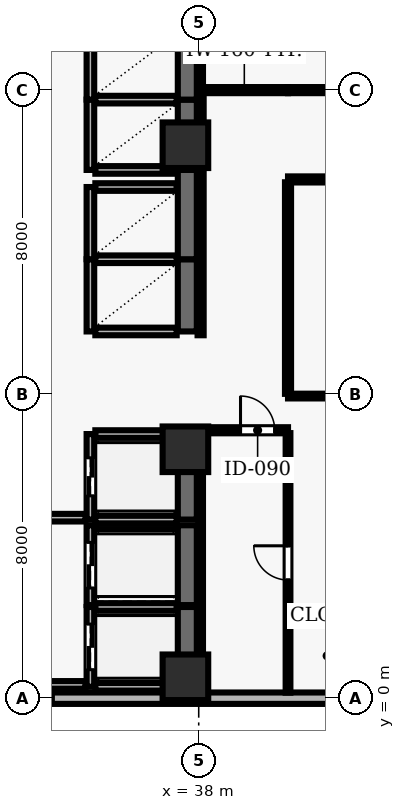
"""IFC4 building model, lengths in metres.
Left out: names, types, materials, properties, quantities, classifications, styles, units other than length and angle.
Written with IfcOpenShell. Run it as: python <this file> out.ifc"""

import sys

from ifc_helpers import new_model, si_unit, direction, frame, frame_2d, origin, origin_2d, place, context, subcontext, project, spatial, rectangle, extrude, element, fill, save


model = new_model("IFC4")
c1 = context("Model", 3, precision=1e-05, world=origin(), true_north=direction((0.0, 1.0)))
c2 = subcontext(c1, "Body", "Model", "MODEL_VIEW")
j1 = project(units=[si_unit("LENGTHUNIT", "METRE"), si_unit("PLANEANGLEUNIT", "RADIAN")], contexts=[c1])
p1 = place(None, origin())
s1 = spatial("IfcSite", under=j1, at=p1, CompositionType="ELEMENT")
p2 = place(p1, origin())
s2 = spatial("IfcBuilding", under=s1, at=p2, CompositionType="ELEMENT")
p3 = place(p2, frame((0.0, 0.0, 150.2)))
s3 = spatial("IfcBuildingStorey", under=s2, at=p3, CompositionType="ELEMENT", Elevation=150.2)
for number, where, z_axis, x_axis in (
    (1, (37.65, 0.55, 0.0), (0.0, 0.0, 1.0), (1.0, 0.0, 0.0)),
    (2, (37.65, 6.55, 0.0), (0.0, 0.0, 1.0), (1.0, 0.0, 0.0)),
    (3, (37.65, 14.55, 0.0), (0.0, 0.0, 1.0), (1.0, 0.0, 0.0)),
):
    element("IfcColumn", number, at=place(p3, frame(where, z_axis=z_axis, x_axis=x_axis)), inside=s3, PredefinedType="COLUMN", context=c2, shape_type="SweptSolid", body=[
        extrude(rectangle(XDim=1.2, YDim=1.2, at=origin_2d()), origin(), (0.0, 0.0, 1.0), 3.9),
    ])
p4 = place(p3, frame((24.5, 0.0, 0.0), z_axis=(0.0, 0.0, 1.0), x_axis=(1.0, 0.0, 0.0)))
e4 = element("IfcWall", 4, at=p4, inside=s3, PredefinedType="SOLIDWALL", context=c2, shape_type="SweptSolid", body=[
    extrude(rectangle(XDim=43.6, YDim=0.3, at=frame_2d((21.8, 0.0))), origin(), (0.0, 0.0, 1.0), 3.69),
])
p5 = place(p4, frame((2.125, 0.0, 0.9)))
e5 = element("IfcOpeningElement", 5, at=p5, cuts=e4, PredefinedType="OPENING", context=c2, shape_type="SweptSolid", body=[
    extrude(rectangle(XDim=1.2, YDim=1.6, at=frame_2d((0.6, 0.8))), frame((0.0, 0.16, 0.0), z_axis=(0.0, -1.0, 0.0), x_axis=(1.0, 0.0, 0.0)), (0.0, 0.0, 1.0), 0.32),
])
p6 = place(p4, frame((8.475, 0.0, 0.9)))
e6 = element("IfcOpeningElement", 6, at=p6, cuts=e4, PredefinedType="OPENING", context=c2, shape_type="SweptSolid", body=[
    extrude(rectangle(XDim=1.2, YDim=1.6, at=frame_2d((0.6, 0.8))), frame((0.0, 0.16, 0.0), z_axis=(0.0, -1.0, 0.0), x_axis=(1.0, 0.0, 0.0)), (0.0, 0.0, 1.0), 0.32),
])
p7 = place(p4, frame((18.475, 0.0, 0.9)))
e7 = element("IfcOpeningElement", 7, at=p7, cuts=e4, PredefinedType="OPENING", context=c2, shape_type="SweptSolid", body=[
    extrude(rectangle(XDim=1.2, YDim=1.6, at=frame_2d((0.6, 0.8))), frame((0.0, 0.16, 0.0), z_axis=(0.0, -1.0, 0.0), x_axis=(1.0, 0.0, 0.0)), (0.0, 0.0, 1.0), 0.32),
])
p8 = place(p4, frame((23.025, 0.0, 0.9)))
e8 = element("IfcOpeningElement", 8, at=p8, cuts=e4, PredefinedType="OPENING", context=c2, shape_type="SweptSolid", body=[
    extrude(rectangle(XDim=1.2, YDim=1.6, at=frame_2d((0.6, 0.8))), frame((0.0, 0.16, 0.0), z_axis=(0.0, -1.0, 0.0), x_axis=(1.0, 0.0, 0.0)), (0.0, 0.0, 1.0), 0.32),
])
p9 = place(p4, frame((29.375, 0.0, 0.9)))
e9 = element("IfcOpeningElement", 9, at=p9, cuts=e4, PredefinedType="OPENING", context=c2, shape_type="SweptSolid", body=[
    extrude(rectangle(XDim=1.2, YDim=1.6, at=frame_2d((0.6, 0.8))), frame((0.0, 0.16, 0.0), z_axis=(0.0, -1.0, 0.0), x_axis=(1.0, 0.0, 0.0)), (0.0, 0.0, 1.0), 0.32),
])
p10 = place(p4, frame((40.275, 0.0, 0.9)))
e10 = element("IfcOpeningElement", 10, at=p10, cuts=e4, PredefinedType="OPENING", context=c2, shape_type="SweptSolid", body=[
    extrude(rectangle(XDim=1.2, YDim=1.6, at=frame_2d((0.6, 0.8))), frame((0.0, 0.16, 0.0), z_axis=(0.0, -1.0, 0.0), x_axis=(1.0, 0.0, 0.0)), (0.0, 0.0, 1.0), 0.32),
])
p11 = place(p3, frame((35.15, 2.4, 0.0), z_axis=(0.0, 0.0, 1.0), x_axis=(0.0, -1.0, 0.0)))
e11 = element("IfcWall", 11, at=p11, inside=s3, PredefinedType="SOLIDWALL", context=c2, shape_type="SweptSolid", body=[
    extrude(rectangle(XDim=2.1, YDim=0.2, at=frame_2d((1.05, 0.0))), origin(), (0.0, 0.0, 1.0), 3.69),
])
p12 = place(p11, frame((0.45, 0.0, 0.0)))
e12 = element("IfcOpeningElement", 12, at=p12, cuts=e11, PredefinedType="OPENING", context=c2, shape_type="SweptSolid", body=[
    extrude(rectangle(XDim=1.2, YDim=2.15, at=frame_2d((0.6, 1.075))), frame((0.0, 0.11, 0.0), z_axis=(0.0, -1.0, 0.0), x_axis=(1.0, 0.0, 0.0)), (0.0, 0.0, 1.0), 0.22),
])
p13 = place(p3, frame((37.7, 0.3, 0.0), z_axis=(0.0, 0.0, 1.0), x_axis=(0.0, 1.0, 0.0)))
e13 = element("IfcWall", 13, at=p13, inside=s3, PredefinedType="SHEAR", context=c2, shape_type="SweptSolid", body=[
    extrude(rectangle(XDim=2.1, YDim=0.5, at=frame_2d((1.05, 0.0))), origin(), (0.0, 0.0, 1.0), 3.69),
])
for number, where, z_axis, x_axis in (
    (14, (35.28, 0.3, 0.0), (0.0, 0.0, 1.0), (1.0, 0.0, 0.0)),
    (15, (37.42, 2.4, 0.0), (0.0, 0.0, 1.0), (-1.0, 0.0, 0.0)),
):
    element("IfcWall", number, at=place(p3, frame(where, z_axis=z_axis, x_axis=x_axis)), inside=s3, PredefinedType="SOLIDWALL", context=c2, shape_type="SweptSolid", body=[
        extrude(rectangle(XDim=2.14, YDim=0.2, at=frame_2d((1.07, 0.0))), origin(), (0.0, 0.0, 1.0), 3.69),
    ])
p14 = place(p3, frame((35.15, 4.55, 0.0), z_axis=(0.0, 0.0, 1.0), x_axis=(0.0, -1.0, 0.0)))
e16 = element("IfcWall", 16, at=p14, inside=s3, PredefinedType="SOLIDWALL", context=c2, shape_type="SweptSolid", body=[
    extrude(rectangle(XDim=2.1, YDim=0.2, at=frame_2d((1.05, 0.0))), origin(), (0.0, 0.0, 1.0), 3.69),
])
p15 = place(p14, frame((0.45, 0.0, 0.0)))
e17 = element("IfcOpeningElement", 17, at=p15, cuts=e16, PredefinedType="OPENING", context=c2, shape_type="SweptSolid", body=[
    extrude(rectangle(XDim=1.2, YDim=2.15, at=frame_2d((0.6, 1.075))), frame((0.0, 0.11, 0.0), z_axis=(0.0, -1.0, 0.0), x_axis=(1.0, 0.0, 0.0)), (0.0, 0.0, 1.0), 0.22),
])
p16 = place(p3, frame((37.7, 2.45, 0.0), z_axis=(0.0, 0.0, 1.0), x_axis=(0.0, 1.0, 0.0)))
e18 = element("IfcWall", 18, at=p16, inside=s3, PredefinedType="SHEAR", context=c2, shape_type="SweptSolid", body=[
    extrude(rectangle(XDim=2.1, YDim=0.5, at=frame_2d((1.05, 0.0))), origin(), (0.0, 0.0, 1.0), 3.69),
])
p17 = place(p3, frame((37.42, 4.55, 0.0), z_axis=(0.0, 0.0, 1.0), x_axis=(-1.0, 0.0, 0.0)))
e19 = element("IfcWall", 19, at=p17, inside=s3, PredefinedType="SOLIDWALL", context=c2, shape_type="SweptSolid", body=[
    extrude(rectangle(XDim=2.14, YDim=0.2, at=frame_2d((1.07, 0.0))), origin(), (0.0, 0.0, 1.0), 3.69),
])
p18 = place(p3, frame((35.15, 6.95, 0.0), z_axis=(0.0, 0.0, 1.0), x_axis=(0.0, -1.0, 0.0)))
e20 = element("IfcWall", 20, at=p18, inside=s3, PredefinedType="SOLIDWALL", context=c2, shape_type="SweptSolid", body=[
    extrude(rectangle(XDim=2.25, YDim=0.2, at=frame_2d((1.125, 0.0))), origin(), (0.0, 0.0, 1.0), 3.69),
])
p19 = place(p18, frame((0.625, 0.0, 0.0)))
e21 = element("IfcOpeningElement", 21, at=p19, cuts=e20, PredefinedType="OPENING", context=c2, shape_type="SweptSolid", body=[
    extrude(rectangle(XDim=1.0, YDim=2.1, at=frame_2d((0.5, 1.05))), frame((0.0, 0.11, 0.0), z_axis=(0.0, -1.0, 0.0), x_axis=(1.0, 0.0, 0.0)), (0.0, 0.0, 1.0), 0.22),
])
p20 = place(p3, frame((37.7, 4.7, 0.0), z_axis=(0.0, 0.0, 1.0), x_axis=(0.0, 1.0, 0.0)))
e22 = element("IfcWall", 22, at=p20, inside=s3, PredefinedType="SHEAR", context=c2, shape_type="SweptSolid", body=[
    extrude(rectangle(XDim=2.25, YDim=0.5, at=frame_2d((1.125, 0.0))), origin(), (0.0, 0.0, 1.0), 3.69),
])
for number, where, z_axis, x_axis in (
    (23, (35.28, 4.7, 0.0), (0.0, 0.0, 1.0), (1.0, 0.0, 0.0)),
    (24, (37.42, 6.95, 0.0), (0.0, 0.0, 1.0), (-1.0, 0.0, 0.0)),
):
    element("IfcWall", number, at=place(p3, frame(where, z_axis=z_axis, x_axis=x_axis)), inside=s3, PredefinedType="SOLIDWALL", context=c2, shape_type="SweptSolid", body=[
        extrude(rectangle(XDim=2.14, YDim=0.2, at=frame_2d((1.07, 0.0))), origin(), (0.0, 0.0, 1.0), 3.69),
    ])
p21 = place(p3, frame((35.15, 11.55, 0.0), z_axis=(0.0, 0.0, 1.0), x_axis=(0.0, -1.0, 0.0)))
e25 = element("IfcWall", 25, at=p21, inside=s3, PredefinedType="SOLIDWALL", context=c2, shape_type="SweptSolid", body=[
    extrude(rectangle(XDim=1.9, YDim=0.2, at=frame_2d((0.95, 0.0))), origin(), (0.0, 0.0, 1.0), 3.69),
])
p22 = place(p3, frame((37.7, 9.65, 0.0), z_axis=(0.0, 0.0, 1.0), x_axis=(0.0, 1.0, 0.0)))
e26 = element("IfcWall", 26, at=p22, inside=s3, PredefinedType="SHEAR", context=c2, shape_type="SweptSolid", body=[
    extrude(rectangle(XDim=1.9, YDim=0.5, at=frame_2d((0.95, 0.0))), origin(), (0.0, 0.0, 1.0), 3.69),
])
for number, where, z_axis, x_axis in (
    (27, (35.28, 9.65, 0.0), (0.0, 0.0, 1.0), (1.0, 0.0, 0.0)),
    (28, (37.42, 11.55, 0.0), (0.0, 0.0, 1.0), (-1.0, 0.0, 0.0)),
):
    element("IfcWall", number, at=place(p3, frame(where, z_axis=z_axis, x_axis=x_axis)), inside=s3, PredefinedType="SOLIDWALL", context=c2, shape_type="SweptSolid", body=[
        extrude(rectangle(XDim=2.14, YDim=0.2, at=frame_2d((1.07, 0.0))), origin(), (0.0, 0.0, 1.0), 3.69),
    ])
p23 = place(p3, frame((35.15, 13.45, 0.0), z_axis=(0.0, 0.0, 1.0), x_axis=(0.0, -1.0, 0.0)))
e29 = element("IfcWall", 29, at=p23, inside=s3, PredefinedType="SOLIDWALL", context=c2, shape_type="SweptSolid", body=[
    extrude(rectangle(XDim=1.9, YDim=0.2, at=frame_2d((0.95, 0.0))), origin(), (0.0, 0.0, 1.0), 3.69),
])
p24 = place(p3, frame((37.7, 11.55, 0.0), z_axis=(0.0, 0.0, 1.0), x_axis=(0.0, 1.0, 0.0)))
e30 = element("IfcWall", 30, at=p24, inside=s3, PredefinedType="SHEAR", context=c2, shape_type="SweptSolid", body=[
    extrude(rectangle(XDim=2.35, YDim=0.5, at=frame_2d((1.175, 0.0))), origin(), (0.0, 0.0, 1.0), 3.69),
])
p25 = place(p3, frame((37.42, 13.45, 0.0), z_axis=(0.0, 0.0, 1.0), x_axis=(-1.0, 0.0, 0.0)))
e31 = element("IfcWall", 31, at=p25, inside=s3, PredefinedType="SOLIDWALL", context=c2, shape_type="SweptSolid", body=[
    extrude(rectangle(XDim=2.14, YDim=0.2, at=frame_2d((1.07, 0.0))), origin(), (0.0, 0.0, 1.0), 3.69),
])
p26 = place(p3, frame((35.15, 15.75, 0.0), z_axis=(0.0, 0.0, 1.0), x_axis=(0.0, -1.0, 0.0)))
e32 = element("IfcWall", 32, at=p26, inside=s3, PredefinedType="SOLIDWALL", context=c2, shape_type="SweptSolid", body=[
    extrude(rectangle(XDim=1.85, YDim=0.2, at=frame_2d((0.925, 0.0))), origin(), (0.0, 0.0, 1.0), 3.69),
])
p27 = place(p3, frame((37.7, 13.9, 0.0), z_axis=(0.0, 0.0, 1.0), x_axis=(0.0, 1.0, 0.0)))
e33 = element("IfcWall", 33, at=p27, inside=s3, PredefinedType="SHEAR", context=c2, shape_type="SweptSolid", body=[
    extrude(rectangle(XDim=1.85, YDim=0.5, at=frame_2d((0.925, 0.0))), origin(), (0.0, 0.0, 1.0), 3.69),
])
for number, where, z_axis, x_axis in (
    (34, (35.28, 13.9, 0.0), (0.0, 0.0, 1.0), (1.0, 0.0, 0.0)),
    (35, (37.42, 15.75, 0.0), (0.0, 0.0, 1.0), (-1.0, 0.0, 0.0)),
):
    element("IfcWall", number, at=place(p3, frame(where, z_axis=z_axis, x_axis=x_axis)), inside=s3, PredefinedType="SOLIDWALL", context=c2, shape_type="SweptSolid", body=[
        extrude(rectangle(XDim=2.14, YDim=0.2, at=frame_2d((1.07, 0.0))), origin(), (0.0, 0.0, 1.0), 3.69),
    ])
p28 = place(p3, frame((35.15, 17.6, 0.0), z_axis=(0.0, 0.0, 1.0), x_axis=(0.0, -1.0, 0.0)))
e36 = element("IfcWall", 36, at=p28, inside=s3, PredefinedType="SOLIDWALL", context=c2, shape_type="SweptSolid", body=[
    extrude(rectangle(XDim=1.85, YDim=0.2, at=frame_2d((0.925, 0.0))), origin(), (0.0, 0.0, 1.0), 3.69),
])
p29 = place(p3, frame((37.7, 15.75, 0.0), z_axis=(0.0, 0.0, 1.0), x_axis=(0.0, 1.0, 0.0)))
e37 = element("IfcWall", 37, at=p29, inside=s3, PredefinedType="SHEAR", context=c2, shape_type="SweptSolid", body=[
    extrude(rectangle(XDim=1.85, YDim=0.5, at=frame_2d((0.925, 0.0))), origin(), (0.0, 0.0, 1.0), 3.69),
])
p30 = place(p3, frame((31.65, 0.35, 0.0), z_axis=(0.0, 0.0, 1.0), x_axis=(1.0, 0.0, 0.0)))
e38 = element("IfcWall", 38, at=p30, inside=s3, PredefinedType="SOLIDWALL", context=c2, shape_type="SweptSolid", body=[
    extrude(rectangle(XDim=3.37, YDim=0.2, at=frame_2d((1.685, 0.0))), origin(), (0.0, 0.0, 1.0), 3.69),
])
p31 = place(p3, frame((35.02, 4.75, 0.0), z_axis=(0.0, 0.0, 1.0), x_axis=(-1.0, 0.0, 0.0)))
e39 = element("IfcWall", 39, at=p31, inside=s3, PredefinedType="SOLIDWALL", context=c2, shape_type="SweptSolid", body=[
    extrude(rectangle(XDim=3.11, YDim=0.2, at=frame_2d((1.555, 0.0))), origin(), (0.0, 0.0, 1.0), 3.69),
])
p32 = place(p31, frame((1.03, 0.0, 0.0)))
e40 = element("IfcOpeningElement", 40, at=p32, cuts=e39, PredefinedType="OPENING", context=c2, shape_type="SweptSolid", body=[
    extrude(rectangle(XDim=1.05, YDim=2.15, at=frame_2d((0.525, 1.075))), frame((0.0, 0.11, 0.0), z_axis=(0.0, -1.0, 0.0), x_axis=(1.0, 0.0, 0.0)), (0.0, 0.0, 1.0), 0.22),
])
p33 = place(p3, frame((38.05, 7.05, 0.0), z_axis=(0.0, 0.0, 1.0), x_axis=(1.0, 0.0, 0.0)))
e41 = element("IfcWall", 41, at=p33, inside=s3, PredefinedType="PARTITIONING", context=c2, shape_type="SweptSolid", body=[
    extrude(rectangle(XDim=2.3, YDim=0.16, at=frame_2d((1.15, 0.0))), origin(), (0.0, 0.0, 1.0), 3.69),
])
p34 = place(p33, frame((1.05, 0.0, 0.0)))
e42 = element("IfcOpeningElement", 42, at=p34, cuts=e41, PredefinedType="OPENING", context=c2, shape_type="SweptSolid", body=[
    extrude(rectangle(XDim=0.9, YDim=2.1, at=frame_2d((0.45, 1.05))), frame((0.0, 0.09, 0.0), z_axis=(0.0, -1.0, 0.0), x_axis=(1.0, 0.0, 0.0)), (0.0, 0.0, 1.0), 0.18),
])
p35 = place(p3, frame((40.35, 13.65, 0.0), z_axis=(0.0, 0.0, 1.0), x_axis=(1.0, 0.0, 0.0)))
e43 = element("IfcWall", 43, at=p35, inside=s3, PredefinedType="PARTITIONING", context=c2, shape_type="SweptSolid", body=[
    extrude(rectangle(XDim=9.07, YDim=0.16, at=frame_2d((4.535, 0.0))), origin(), (0.0, 0.0, 1.0), 3.69),
])
p36 = place(p35, frame((3.735, 0.0, 0.0)))
e44 = element("IfcOpeningElement", 44, at=p36, cuts=e43, PredefinedType="OPENING", context=c2, shape_type="SweptSolid", body=[
    extrude(rectangle(XDim=0.9, YDim=2.1, at=frame_2d((0.45, 1.05))), frame((0.0, 0.09, 0.0), z_axis=(0.0, -1.0, 0.0), x_axis=(1.0, 0.0, 0.0)), (0.0, 0.0, 1.0), 0.18),
])
p37 = place(p3, frame((40.35, 16.0, 0.0), z_axis=(0.0, 0.0, 1.0), x_axis=(-1.0, 0.0, 0.0)))
e45 = element("IfcWall", 45, at=p37, inside=s3, PredefinedType="PARTITIONING", context=c2, shape_type="SweptSolid", body=[
    extrude(rectangle(XDim=2.3, YDim=0.16, at=frame_2d((1.15, 0.0))), origin(), (0.0, 0.0, 1.0), 3.69),
])
p38 = place(p3, frame((40.35, 16.0, 0.0), z_axis=(0.0, 0.0, 1.0), x_axis=(1.0, 0.0, 0.0)))
e46 = element("IfcWall", 46, at=p38, inside=s3, PredefinedType="PARTITIONING", context=c2, shape_type="SweptSolid", body=[
    extrude(rectangle(XDim=4.899, YDim=0.16, at=frame_2d((2.449, 0.0))), origin(), (0.0, 0.0, 1.0), 3.69),
])
p39 = place(p38, frame((2.0, 0.0, 0.0)))
e47 = element("IfcOpeningElement", 47, at=p39, cuts=e46, PredefinedType="OPENING", context=c2, shape_type="SweptSolid", body=[
    extrude(rectangle(XDim=0.9, YDim=2.1, at=frame_2d((0.45, 1.05))), frame((0.0, 0.09, 0.0), z_axis=(0.0, -1.0, 0.0), x_axis=(1.0, 0.0, 0.0)), (0.0, 0.0, 1.0), 0.18),
])
p40 = place(p3, frame((49.42, 7.95, 0.0), z_axis=(0.0, 0.0, 1.0), x_axis=(-1.0, 0.0, 0.0)))
e48 = element("IfcWall", 48, at=p40, inside=s3, PredefinedType="PARTITIONING", context=c2, shape_type="SweptSolid", body=[
    extrude(rectangle(XDim=9.07, YDim=0.125, at=frame_2d((4.535, 0.0))), origin(), (0.0, 0.0, 1.0), 3.074),
])
p41 = place(p3, frame((38.05, 6.975, 0.0), z_axis=(0.0, 0.0, 1.0), x_axis=(0.0, -1.0, 0.0)))
e49 = element("IfcWall", 49, at=p41, inside=s3, PredefinedType="PARTITIONING", context=c2, shape_type="SweptSolid", body=[
    extrude(rectangle(XDim=6.83, YDim=0.125, at=frame_2d((3.415, 0.0))), origin(), (0.0, 0.0, 1.0), 3.074),
])
p42 = place(p3, frame((38.05, 15.925, 0.0), z_axis=(0.0, 0.0, 1.0), x_axis=(0.0, -1.0, 0.0)))
e50 = element("IfcWall", 50, at=p42, inside=s3, PredefinedType="PARTITIONING", context=c2, shape_type="SweptSolid", body=[
    extrude(rectangle(XDim=6.375, YDim=0.16, at=frame_2d((3.188, 0.0))), origin(), (0.0, 0.0, 1.0), 3.074),
])
p43 = place(p3, frame((38.05, 23.405, 0.0), z_axis=(0.0, 0.0, 1.0), x_axis=(0.0, -1.0, 0.0)))
e51 = element("IfcWall", 51, at=p43, inside=s3, PredefinedType="PARTITIONING", context=c2, shape_type="SweptSolid", body=[
    extrude(rectangle(XDim=7.33, YDim=0.125, at=frame_2d((3.665, 0.0))), origin(), (0.0, 0.0, 1.0), 3.074),
])
p44 = place(p3, frame((40.35, 0.145, 0.0), z_axis=(0.0, 0.0, 1.0), x_axis=(0.0, 1.0, 0.0)))
e52 = element("IfcWall", 52, at=p44, inside=s3, PredefinedType="PARTITIONING", context=c2, shape_type="SweptSolid", body=[
    extrude(rectangle(XDim=6.83, YDim=0.125, at=frame_2d((3.415, 0.0))), origin(), (0.0, 0.0, 1.0), 3.69),
])
p45 = place(p44, frame((2.965, 0.0, 0.0)))
e53 = element("IfcOpeningElement", 53, at=p45, cuts=e52, PredefinedType="OPENING", context=c2, shape_type="SweptSolid", body=[
    extrude(rectangle(XDim=0.9, YDim=2.1, at=frame_2d((0.45, 1.05))), frame((0.0, 0.073, 0.0), z_axis=(0.0, -1.0, 0.0), x_axis=(1.0, 0.0, 0.0)), (0.0, 0.0, 1.0), 0.145),
])
p46 = place(p3, frame((40.35, 8.008, 0.0), z_axis=(0.0, 0.0, 1.0), x_axis=(0.0, 1.0, 0.0)))
e54 = element("IfcWall", 54, at=p46, inside=s3, PredefinedType="PARTITIONING", context=c2, shape_type="SweptSolid", body=[
    extrude(rectangle(XDim=5.567, YDim=0.16, at=frame_2d((2.783, 0.0))), origin(), (0.0, 0.0, 1.0), 3.69),
])
p47 = place(p6, origin())
e55 = element("IfcWindow", 55, at=p47, inside=s3, PartitioningType="SINGLE_PANEL", PredefinedType="WINDOW", context=c2, shape_type="SweptSolid", body=[
    extrude(rectangle(XDim=1.2, YDim=1.6, at=frame_2d((0.6, 0.8))), frame((0.0, 0.03, 0.0), z_axis=(0.0, -1.0, 0.0), x_axis=(1.0, 0.0, 0.0)), (0.0, 0.0, 1.0), 0.06),
])
fill(e6, e55)
p48 = place(p12, origin())
e56 = element("IfcDoor", 56, at=p48, inside=s3, OperationType="DOUBLE_DOOR_SLIDING", PredefinedType="DOOR", context=c2, shape_type="SweptSolid", body=[
    extrude(rectangle(XDim=1.2, YDim=2.15, at=frame_2d((0.6, 1.075))), frame((0.0, 0.025, 0.0), z_axis=(0.0, -1.0, 0.0), x_axis=(1.0, 0.0, 0.0)), (0.0, 0.0, 1.0), 0.05),
])
fill(e12, e56)
p49 = place(p15, origin())
e57 = element("IfcDoor", 57, at=p49, inside=s3, OperationType="DOUBLE_DOOR_SLIDING", PredefinedType="DOOR", context=c2, shape_type="SweptSolid", body=[
    extrude(rectangle(XDim=1.2, YDim=2.15, at=frame_2d((0.6, 1.075))), frame((0.0, 0.025, 0.0), z_axis=(0.0, -1.0, 0.0), x_axis=(1.0, 0.0, 0.0)), (0.0, 0.0, 1.0), 0.05),
])
fill(e17, e57)
p50 = place(p19, origin())
e58 = element("IfcDoor", 58, at=p50, inside=s3, OperationType="DOUBLE_DOOR_SLIDING", PredefinedType="DOOR", context=c2, shape_type="SweptSolid", body=[
    extrude(rectangle(XDim=1.0, YDim=2.1, at=frame_2d((0.5, 1.05))), frame((0.0, 0.025, 0.0), z_axis=(0.0, -1.0, 0.0), x_axis=(1.0, 0.0, 0.0)), (0.0, 0.0, 1.0), 0.05),
])
fill(e21, e58)
p51 = place(p34, origin())
e59 = element("IfcDoor", 59, at=p51, inside=s3, OperationType="SINGLE_SWING_LEFT", PredefinedType="DOOR", context=c2, shape_type="SweptSolid", body=[
    extrude(rectangle(XDim=0.9, YDim=2.1, at=frame_2d((0.45, 1.05))), frame((0.0, 0.025, 0.0), z_axis=(0.0, -1.0, 0.0), x_axis=(1.0, 0.0, 0.0)), (0.0, 0.0, 1.0), 0.05),
])
fill(e42, e59)
p52 = place(p45, origin())
e60 = element("IfcDoor", 60, at=p52, inside=s3, OperationType="SINGLE_SWING_RIGHT", PredefinedType="DOOR", context=c2, shape_type="SweptSolid", body=[
    extrude(rectangle(XDim=0.9, YDim=2.1, at=frame_2d((0.45, 1.05))), frame((0.0, 0.025, 0.0), z_axis=(0.0, -1.0, 0.0), x_axis=(1.0, 0.0, 0.0)), (0.0, 0.0, 1.0), 0.05),
])
fill(e53, e60)
save(model, sys.argv[1])
